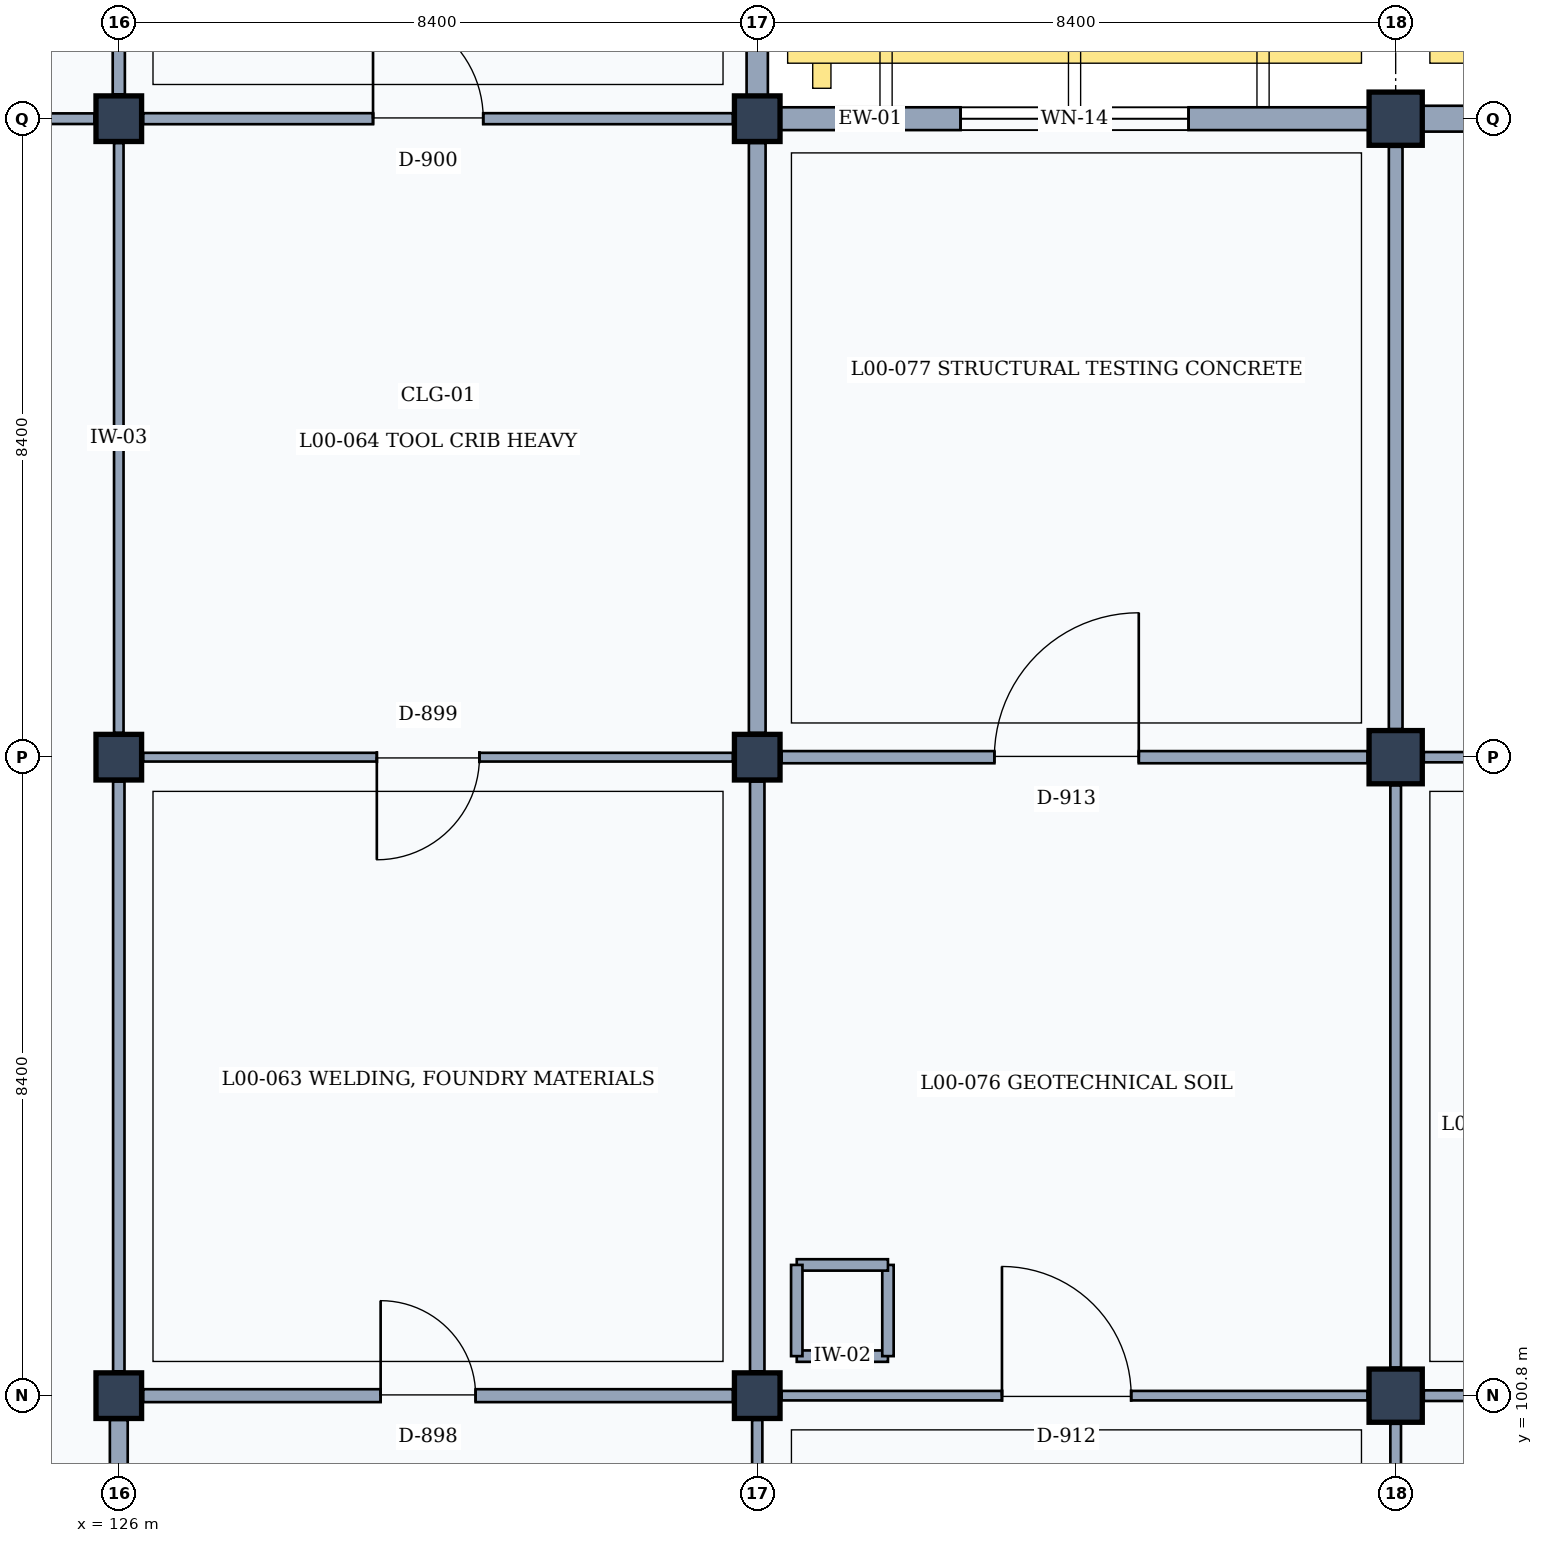
"""IFC4 building model, lengths in metres.
Left out: names, types, materials, properties, quantities, classifications, styles, units other than length and angle.
Written with IfcOpenShell. Run it as: python <this file> out.ifc"""

import sys

from ifc_helpers import new_model, si_unit, direction, frame, frame_2d, origin, origin_2d, place, context, subcontext, project, spatial, rectangle, extrude, element, fill, save


model = new_model("IFC4")
c1 = context("Model", 3, precision=1e-05, world=origin(), true_north=direction((0.0, 1.0)))
c2 = subcontext(c1, "Body", "Model", "MODEL_VIEW")
j1 = project(units=[si_unit("LENGTHUNIT", "METRE"), si_unit("PLANEANGLEUNIT", "RADIAN")], contexts=[c1])
p1 = place(None, origin())
s1 = spatial("IfcSite", under=j1, at=p1, CompositionType="ELEMENT")
p2 = place(p1, origin())
s2 = spatial("IfcBuilding", under=s1, at=p2, CompositionType="ELEMENT")
p3 = place(p2, origin())
s3 = spatial("IfcBuildingStorey", under=s2, at=p3, CompositionType="ELEMENT", Elevation=0.0)
for number, where, z_axis, x_axis in (
    (1, (126.0, 100.8, 0.0), (0.0, 0.0, 1.0), (1.0, 0.0, 0.0)),
    (2, (126.0, 109.2, 0.0), (0.0, 0.0, 1.0), (1.0, 0.0, 0.0)),
    (3, (126.0, 117.6, 0.0), (0.0, 0.0, 1.0), (1.0, 0.0, 0.0)),
    (4, (134.4, 100.8, 0.0), (0.0, 0.0, 1.0), (1.0, 0.0, 0.0)),
    (5, (134.4, 109.2, 0.0), (0.0, 0.0, 1.0), (1.0, 0.0, 0.0)),
    (6, (134.4, 117.6, 0.0), (0.0, 0.0, 1.0), (1.0, 0.0, 0.0)),
):
    element("IfcColumn", number, at=place(p3, frame(where, z_axis=z_axis, x_axis=x_axis)), inside=s3, PredefinedType="COLUMN", context=c2, shape_type="SweptSolid", body=[
        extrude(rectangle(XDim=0.6, YDim=0.6, at=origin_2d()), origin(), (0.0, 0.0, 1.0), 4.8),
    ])
for number, where, z_axis, x_axis in (
    (7, (142.8, 100.8, 0.0), (0.0, 0.0, 1.0), (1.0, 0.0, 0.0)),
    (8, (142.8, 109.2, 0.0), (0.0, 0.0, 1.0), (1.0, 0.0, 0.0)),
    (9, (142.8, 117.6, 0.0), (0.0, 0.0, 1.0), (1.0, 0.0, 0.0)),
):
    element("IfcColumn", number, at=place(p3, frame(where, z_axis=z_axis, x_axis=x_axis)), inside=s3, PredefinedType="COLUMN", context=c2, shape_type="SweptSolid", body=[
        extrude(rectangle(XDim=0.7, YDim=0.7, at=origin_2d()), origin(), (0.0, 0.0, 1.0), 4.8),
    ])
p4 = place(p3, frame((134.4, 125.7, 0.0), z_axis=(0.0, 0.0, 1.0), x_axis=(0.0, -1.0, 0.0)))
e10 = element("IfcWall", 10, at=p4, inside=s3, PredefinedType="SOLIDWALL", context=c2, shape_type="SweptSolid", body=[
    extrude(rectangle(XDim=7.8, YDim=0.28, at=frame_2d((3.9, 0.0))), origin(), (0.0, 0.0, 1.0), 3.96),
])
p5 = place(p4, frame((3.1, 0.0, 0.95)))
e11 = element("IfcOpeningElement", 11, at=p5, cuts=e10, PredefinedType="OPENING", context=c2, shape_type="SweptSolid", body=[
    extrude(rectangle(XDim=1.6, YDim=2.0, at=frame_2d((0.8, 1.0))), frame((0.0, 0.15, 0.0), z_axis=(0.0, -1.0, 0.0), x_axis=(1.0, 0.0, 0.0)), (0.0, 0.0, 1.0), 0.3),
])
p6 = place(p3, frame((134.7, 117.6, 0.0), z_axis=(0.0, 0.0, 1.0), x_axis=(1.0, 0.0, 0.0)))
e12 = element("IfcWall", 12, at=p6, inside=s3, PredefinedType="SOLIDWALL", context=c2, shape_type="SweptSolid", body=[
    extrude(rectangle(XDim=7.75, YDim=0.3, at=frame_2d((3.875, 0.0))), origin(), (0.0, 0.0, 1.0), 3.96),
])
p7 = place(p6, frame((2.375, 0.0, 0.95)))
e13 = element("IfcOpeningElement", 13, at=p7, cuts=e12, PredefinedType="OPENING", context=c2, shape_type="SweptSolid", body=[
    extrude(rectangle(XDim=3.0, YDim=1.8, at=frame_2d((1.5, 0.9))), frame((0.0, 0.16, 0.0), z_axis=(0.0, -1.0, 0.0), x_axis=(1.0, 0.0, 0.0)), (0.0, 0.0, 1.0), 0.32),
])
p8 = place(p3, frame((143.15, 117.6, 0.0), z_axis=(0.0, 0.0, 1.0), x_axis=(1.0, 0.0, 0.0)))
e14 = element("IfcWall", 14, at=p8, inside=s3, PredefinedType="SOLIDWALL", context=c2, shape_type="SweptSolid", body=[
    extrude(rectangle(XDim=7.7, YDim=0.34, at=frame_2d((3.85, 0.0))), origin(), (0.0, 0.0, 1.0), 3.96),
])
p9 = place(p8, frame((3.25, 0.0, 0.95)))
e15 = element("IfcOpeningElement", 15, at=p9, cuts=e14, PredefinedType="OPENING", context=c2, shape_type="SweptSolid", body=[
    extrude(rectangle(XDim=1.2, YDim=1.8, at=frame_2d((0.6, 0.9))), frame((0.0, 0.18, 0.0), z_axis=(0.0, -1.0, 0.0), x_axis=(1.0, 0.0, 0.0)), (0.0, 0.0, 1.0), 0.36),
])
p10 = place(p3, frame((134.92, 101.32, 0.0), z_axis=(0.0, 0.0, 1.0), x_axis=(1.0, 0.0, 0.0)))
e16 = element("IfcWall", 16, at=p10, inside=s3, PredefinedType="PARTITIONING", context=c2, shape_type="SweptSolid", body=[
    extrude(rectangle(XDim=1.2, YDim=0.15, at=frame_2d((0.6, 0.0))), origin(), (0.0, 0.0, 1.0), 4.55),
])
p11 = place(p3, frame((136.12, 101.32, 0.0), z_axis=(0.0, 0.0, 1.0), x_axis=(0.0, 1.0, 0.0)))
e17 = element("IfcWall", 17, at=p11, inside=s3, PredefinedType="PARTITIONING", context=c2, shape_type="SweptSolid", body=[
    extrude(rectangle(XDim=1.2, YDim=0.15, at=frame_2d((0.6, 0.0))), origin(), (0.0, 0.0, 1.0), 4.55),
])
p12 = place(p3, frame((136.12, 102.52, 0.0), z_axis=(0.0, 0.0, 1.0), x_axis=(-1.0, 0.0, 0.0)))
e18 = element("IfcWall", 18, at=p12, inside=s3, PredefinedType="PARTITIONING", context=c2, shape_type="SweptSolid", body=[
    extrude(rectangle(XDim=1.2, YDim=0.15, at=frame_2d((0.6, 0.0))), origin(), (0.0, 0.0, 1.0), 4.55),
])
p13 = place(p3, frame((134.92, 102.52, 0.0), z_axis=(0.0, 0.0, 1.0), x_axis=(0.0, -1.0, 0.0)))
e19 = element("IfcWall", 19, at=p13, inside=s3, PredefinedType="PARTITIONING", context=c2, shape_type="SweptSolid", body=[
    extrude(rectangle(XDim=1.2, YDim=0.15, at=frame_2d((0.6, 0.0))), origin(), (0.0, 0.0, 1.0), 4.55),
])
p14 = place(p3, frame((126.0, 92.72, 0.0), z_axis=(0.0, 0.0, 1.0), x_axis=(0.0, 1.0, 0.0)))
e20 = element("IfcWall", 20, at=p14, inside=s3, PredefinedType="PARTITIONING", context=c2, shape_type="SweptSolid", body=[
    extrude(rectangle(XDim=7.76, YDim=0.235, at=frame_2d((3.88, 0.0))), origin(), (0.0, 0.0, 1.0), 3.92),
])
p15 = place(p3, frame((126.0, 101.12, 0.0), z_axis=(0.0, 0.0, 1.0), x_axis=(0.0, 1.0, 0.0)))
e21 = element("IfcWall", 21, at=p15, inside=s3, PredefinedType="PARTITIONING", context=c2, shape_type="SweptSolid", body=[
    extrude(rectangle(XDim=7.76, YDim=0.15, at=frame_2d((3.88, 0.0))), origin(), (0.0, 0.0, 1.0), 3.92),
])
p16 = place(p3, frame((126.0, 109.52, 0.0), z_axis=(0.0, 0.0, 1.0), x_axis=(0.0, 1.0, 0.0)))
e22 = element("IfcWall", 22, at=p16, inside=s3, PredefinedType="PARTITIONING", context=c2, shape_type="SweptSolid", body=[
    extrude(rectangle(XDim=7.76, YDim=0.125, at=frame_2d((3.88, 0.0))), origin(), (0.0, 0.0, 1.0), 3.92),
])
p17 = place(p3, frame((117.92, 117.6, 0.0), z_axis=(0.0, 0.0, 1.0), x_axis=(1.0, 0.0, 0.0)))
e23 = element("IfcWall", 23, at=p17, inside=s3, PredefinedType="PARTITIONING", context=c2, shape_type="SweptSolid", body=[
    extrude(rectangle(XDim=7.76, YDim=0.14, at=frame_2d((3.88, 0.0))), origin(), (0.0, 0.0, 1.0), 3.92),
])
p18 = place(p17, frame((2.85, 0.0, 0.0)))
e24 = element("IfcOpeningElement", 24, at=p18, cuts=e23, PredefinedType="OPENING", context=c2, shape_type="SweptSolid", body=[
    extrude(rectangle(XDim=1.8, YDim=2.3, at=frame_2d((0.9, 1.15))), frame((0.0, 0.08, 0.0), z_axis=(0.0, -1.0, 0.0), x_axis=(1.0, 0.0, 0.0)), (0.0, 0.0, 1.0), 0.16),
])
p19 = place(p3, frame((126.0, 117.92, 0.0), z_axis=(0.0, 0.0, 1.0), x_axis=(0.0, 1.0, 0.0)))
e25 = element("IfcWall", 25, at=p19, inside=s3, PredefinedType="PARTITIONING", context=c2, shape_type="SweptSolid", body=[
    extrude(rectangle(XDim=7.76, YDim=0.16, at=frame_2d((3.88, 0.0))), origin(), (0.0, 0.0, 1.0), 3.92),
])
p20 = place(p3, frame((134.4, 92.72, 0.0), z_axis=(0.0, 0.0, 1.0), x_axis=(0.0, 1.0, 0.0)))
e26 = element("IfcWall", 26, at=p20, inside=s3, PredefinedType="PARTITIONING", context=c2, shape_type="SweptSolid", body=[
    extrude(rectangle(XDim=7.76, YDim=0.135, at=frame_2d((3.88, 0.0))), origin(), (0.0, 0.0, 1.0), 3.92),
])
p21 = place(p3, frame((126.32, 100.8, 0.0), z_axis=(0.0, 0.0, 1.0), x_axis=(1.0, 0.0, 0.0)))
e27 = element("IfcWall", 27, at=p21, inside=s3, PredefinedType="PARTITIONING", context=c2, shape_type="SweptSolid", body=[
    extrude(rectangle(XDim=7.76, YDim=0.17, at=frame_2d((3.88, 0.0))), origin(), (0.0, 0.0, 1.0), 3.92),
])
p22 = place(p21, frame((3.125, 0.0, 0.0)))
e28 = element("IfcOpeningElement", 28, at=p22, cuts=e27, PredefinedType="OPENING", context=c2, shape_type="SweptSolid", body=[
    extrude(rectangle(XDim=1.25, YDim=2.3, at=frame_2d((0.625, 1.15))), frame((0.0, 0.095, 0.0), z_axis=(0.0, -1.0, 0.0), x_axis=(1.0, 0.0, 0.0)), (0.0, 0.0, 1.0), 0.19),
])
p23 = place(p3, frame((134.4, 101.12, 0.0), z_axis=(0.0, 0.0, 1.0), x_axis=(0.0, 1.0, 0.0)))
e29 = element("IfcWall", 29, at=p23, inside=s3, PredefinedType="PARTITIONING", context=c2, shape_type="SweptSolid", body=[
    extrude(rectangle(XDim=7.76, YDim=0.19, at=frame_2d((3.88, 0.0))), origin(), (0.0, 0.0, 1.0), 3.92),
])
p24 = place(p3, frame((126.32, 109.2, 0.0), z_axis=(0.0, 0.0, 1.0), x_axis=(1.0, 0.0, 0.0)))
e30 = element("IfcWall", 30, at=p24, inside=s3, PredefinedType="PARTITIONING", context=c2, shape_type="SweptSolid", body=[
    extrude(rectangle(XDim=7.76, YDim=0.115, at=frame_2d((3.88, 0.0))), origin(), (0.0, 0.0, 1.0), 3.92),
])
p25 = place(p24, frame((3.075, 0.0, 0.0)))
e31 = element("IfcOpeningElement", 31, at=p25, cuts=e30, PredefinedType="OPENING", context=c2, shape_type="SweptSolid", body=[
    extrude(rectangle(XDim=1.35, YDim=2.25, at=frame_2d((0.675, 1.125))), frame((0.0, 0.067, 0.0), z_axis=(0.0, -1.0, 0.0), x_axis=(1.0, 0.0, 0.0)), (0.0, 0.0, 1.0), 0.135),
])
p26 = place(p3, frame((134.4, 109.52, 0.0), z_axis=(0.0, 0.0, 1.0), x_axis=(0.0, 1.0, 0.0)))
e32 = element("IfcWall", 32, at=p26, inside=s3, PredefinedType="PARTITIONING", context=c2, shape_type="SweptSolid", body=[
    extrude(rectangle(XDim=7.76, YDim=0.22, at=frame_2d((3.88, 0.0))), origin(), (0.0, 0.0, 1.0), 3.92),
])
p27 = place(p3, frame((126.32, 117.6, 0.0), z_axis=(0.0, 0.0, 1.0), x_axis=(1.0, 0.0, 0.0)))
e33 = element("IfcWall", 33, at=p27, inside=s3, PredefinedType="PARTITIONING", context=c2, shape_type="SweptSolid", body=[
    extrude(rectangle(XDim=7.76, YDim=0.145, at=frame_2d((3.88, 0.0))), origin(), (0.0, 0.0, 1.0), 3.92),
])
p28 = place(p27, frame((3.025, 0.0, 0.0)))
e34 = element("IfcOpeningElement", 34, at=p28, cuts=e33, PredefinedType="OPENING", context=c2, shape_type="SweptSolid", body=[
    extrude(rectangle(XDim=1.45, YDim=2.35, at=frame_2d((0.725, 1.175))), frame((0.0, 0.083, 0.0), z_axis=(0.0, -1.0, 0.0), x_axis=(1.0, 0.0, 0.0)), (0.0, 0.0, 1.0), 0.165),
])
p29 = place(p3, frame((142.8, 92.77, 0.0), z_axis=(0.0, 0.0, 1.0), x_axis=(0.0, 1.0, 0.0)))
e35 = element("IfcWall", 35, at=p29, inside=s3, PredefinedType="PARTITIONING", context=c2, shape_type="SweptSolid", body=[
    extrude(rectangle(XDim=7.66, YDim=0.14, at=frame_2d((3.83, 0.0))), origin(), (0.0, 0.0, 1.0), 3.92),
])
p30 = place(p3, frame((134.72, 100.8, 0.0), z_axis=(0.0, 0.0, 1.0), x_axis=(1.0, 0.0, 0.0)))
e36 = element("IfcWall", 36, at=p30, inside=s3, PredefinedType="PARTITIONING", context=c2, shape_type="SweptSolid", body=[
    extrude(rectangle(XDim=7.71, YDim=0.125, at=frame_2d((3.855, 0.0))), origin(), (0.0, 0.0, 1.0), 3.86),
])
p31 = place(p30, frame((2.9, 0.0, 0.0)))
e37 = element("IfcOpeningElement", 37, at=p31, cuts=e36, PredefinedType="OPENING", context=c2, shape_type="SweptSolid", body=[
    extrude(rectangle(XDim=1.7, YDim=2.3, at=frame_2d((0.85, 1.15))), frame((0.0, 0.073, 0.0), z_axis=(0.0, -1.0, 0.0), x_axis=(1.0, 0.0, 0.0)), (0.0, 0.0, 1.0), 0.145),
])
p32 = place(p3, frame((142.8, 101.17, 0.0), z_axis=(0.0, 0.0, 1.0), x_axis=(0.0, 1.0, 0.0)))
e38 = element("IfcWall", 38, at=p32, inside=s3, PredefinedType="PARTITIONING", context=c2, shape_type="SweptSolid", body=[
    extrude(rectangle(XDim=7.66, YDim=0.14, at=frame_2d((3.83, 0.0))), origin(), (0.0, 0.0, 1.0), 3.92),
])
p33 = place(p3, frame((134.72, 109.2, 0.0), z_axis=(0.0, 0.0, 1.0), x_axis=(1.0, 0.0, 0.0)))
e39 = element("IfcWall", 39, at=p33, inside=s3, PredefinedType="PARTITIONING", context=c2, shape_type="SweptSolid", body=[
    extrude(rectangle(XDim=7.71, YDim=0.16, at=frame_2d((3.855, 0.0))), origin(), (0.0, 0.0, 1.0), 3.86),
])
p34 = place(p33, frame((2.8, 0.0, 0.0)))
e40 = element("IfcOpeningElement", 40, at=p34, cuts=e39, PredefinedType="OPENING", context=c2, shape_type="SweptSolid", body=[
    extrude(rectangle(XDim=1.9, YDim=2.4, at=frame_2d((0.95, 1.2))), frame((0.0, 0.09, 0.0), z_axis=(0.0, -1.0, 0.0), x_axis=(1.0, 0.0, 0.0)), (0.0, 0.0, 1.0), 0.18),
])
p35 = place(p3, frame((142.8, 109.57, 0.0), z_axis=(0.0, 0.0, 1.0), x_axis=(0.0, 1.0, 0.0)))
e41 = element("IfcWall", 41, at=p35, inside=s3, PredefinedType="PARTITIONING", context=c2, shape_type="SweptSolid", body=[
    extrude(rectangle(XDim=7.66, YDim=0.18, at=frame_2d((3.83, 0.0))), origin(), (0.0, 0.0, 1.0), 3.92),
])
p36 = place(p3, frame((143.17, 100.8, 0.0), z_axis=(0.0, 0.0, 1.0), x_axis=(1.0, 0.0, 0.0)))
e42 = element("IfcWall", 42, at=p36, inside=s3, PredefinedType="PARTITIONING", context=c2, shape_type="SweptSolid", body=[
    extrude(rectangle(XDim=7.585, YDim=0.14, at=frame_2d((3.792, 0.0))), origin(), (0.0, 0.0, 1.0), 3.87),
])
p37 = place(p3, frame((143.17, 109.2, 0.0), z_axis=(0.0, 0.0, 1.0), x_axis=(1.0, 0.0, 0.0)))
e43 = element("IfcWall", 43, at=p37, inside=s3, PredefinedType="PARTITIONING", context=c2, shape_type="SweptSolid", body=[
    extrude(rectangle(XDim=7.66, YDim=0.135, at=frame_2d((3.83, 0.0))), origin(), (0.0, 0.0, 1.0), 3.87),
])
p38 = place(p37, frame((3.05, 0.0, 0.0)))
e44 = element("IfcOpeningElement", 44, at=p38, cuts=e43, PredefinedType="OPENING", context=c2, shape_type="SweptSolid", body=[
    extrude(rectangle(XDim=1.4, YDim=2.25, at=frame_2d((0.7, 1.125))), frame((0.0, 0.077, 0.0), z_axis=(0.0, -1.0, 0.0), x_axis=(1.0, 0.0, 0.0)), (0.0, 0.0, 1.0), 0.155),
])
p39 = place(p7, origin())
e45 = element("IfcWindow", 45, at=p39, inside=s3, PartitioningType="SINGLE_PANEL", PredefinedType="WINDOW", context=c2, shape_type="SweptSolid", body=[
    extrude(rectangle(XDim=3.0, YDim=1.8, at=frame_2d((1.5, 0.9))), frame((0.0, 0.03, 0.0), z_axis=(0.0, -1.0, 0.0), x_axis=(1.0, 0.0, 0.0)), (0.0, 0.0, 1.0), 0.06),
])
fill(e13, e45)
p40 = place(p22, origin())
e46 = element("IfcDoor", 46, at=p40, inside=s3, OperationType="SINGLE_SWING_LEFT", PredefinedType="DOOR", context=c2, shape_type="SweptSolid", body=[
    extrude(rectangle(XDim=1.25, YDim=2.3, at=frame_2d((0.625, 1.15))), frame((0.0, 0.025, 0.0), z_axis=(0.0, -1.0, 0.0), x_axis=(1.0, 0.0, 0.0)), (0.0, 0.0, 1.0), 0.05),
])
fill(e28, e46)
p41 = place(p25, frame((1.35, 0.0, 0.0), z_axis=(0.0, 0.0, 1.0), x_axis=(-1.0, 0.0, 0.0)))
e47 = element("IfcDoor", 47, at=p41, inside=s3, OperationType="SINGLE_SWING_RIGHT", PredefinedType="DOOR", context=c2, shape_type="SweptSolid", body=[
    extrude(rectangle(XDim=1.35, YDim=2.25, at=frame_2d((0.675, 1.125))), frame((0.0, 0.025, 0.0), z_axis=(0.0, -1.0, 0.0), x_axis=(1.0, 0.0, 0.0)), (0.0, 0.0, 1.0), 0.05),
])
fill(e31, e47)
p42 = place(p28, origin())
e48 = element("IfcDoor", 48, at=p42, inside=s3, OperationType="SINGLE_SWING_LEFT", PredefinedType="DOOR", context=c2, shape_type="SweptSolid", body=[
    extrude(rectangle(XDim=1.45, YDim=2.35, at=frame_2d((0.725, 1.175))), frame((0.0, 0.025, 0.0), z_axis=(0.0, -1.0, 0.0), x_axis=(1.0, 0.0, 0.0)), (0.0, 0.0, 1.0), 0.05),
])
fill(e34, e48)
p43 = place(p31, origin())
e49 = element("IfcDoor", 49, at=p43, inside=s3, OperationType="SINGLE_SWING_LEFT", PredefinedType="DOOR", context=c2, shape_type="SweptSolid", body=[
    extrude(rectangle(XDim=1.7, YDim=2.3, at=frame_2d((0.85, 1.15))), frame((0.0, 0.025, 0.0), z_axis=(0.0, -1.0, 0.0), x_axis=(1.0, 0.0, 0.0)), (0.0, 0.0, 1.0), 0.05),
])
fill(e37, e49)
p44 = place(p34, origin())
e50 = element("IfcDoor", 50, at=p44, inside=s3, OperationType="SINGLE_SWING_RIGHT", PredefinedType="DOOR", context=c2, shape_type="SweptSolid", body=[
    extrude(rectangle(XDim=1.9, YDim=2.4, at=frame_2d((0.95, 1.2))), frame((0.0, 0.025, 0.0), z_axis=(0.0, -1.0, 0.0), x_axis=(1.0, 0.0, 0.0)), (0.0, 0.0, 1.0), 0.05),
])
fill(e40, e50)
save(model, sys.argv[1])
